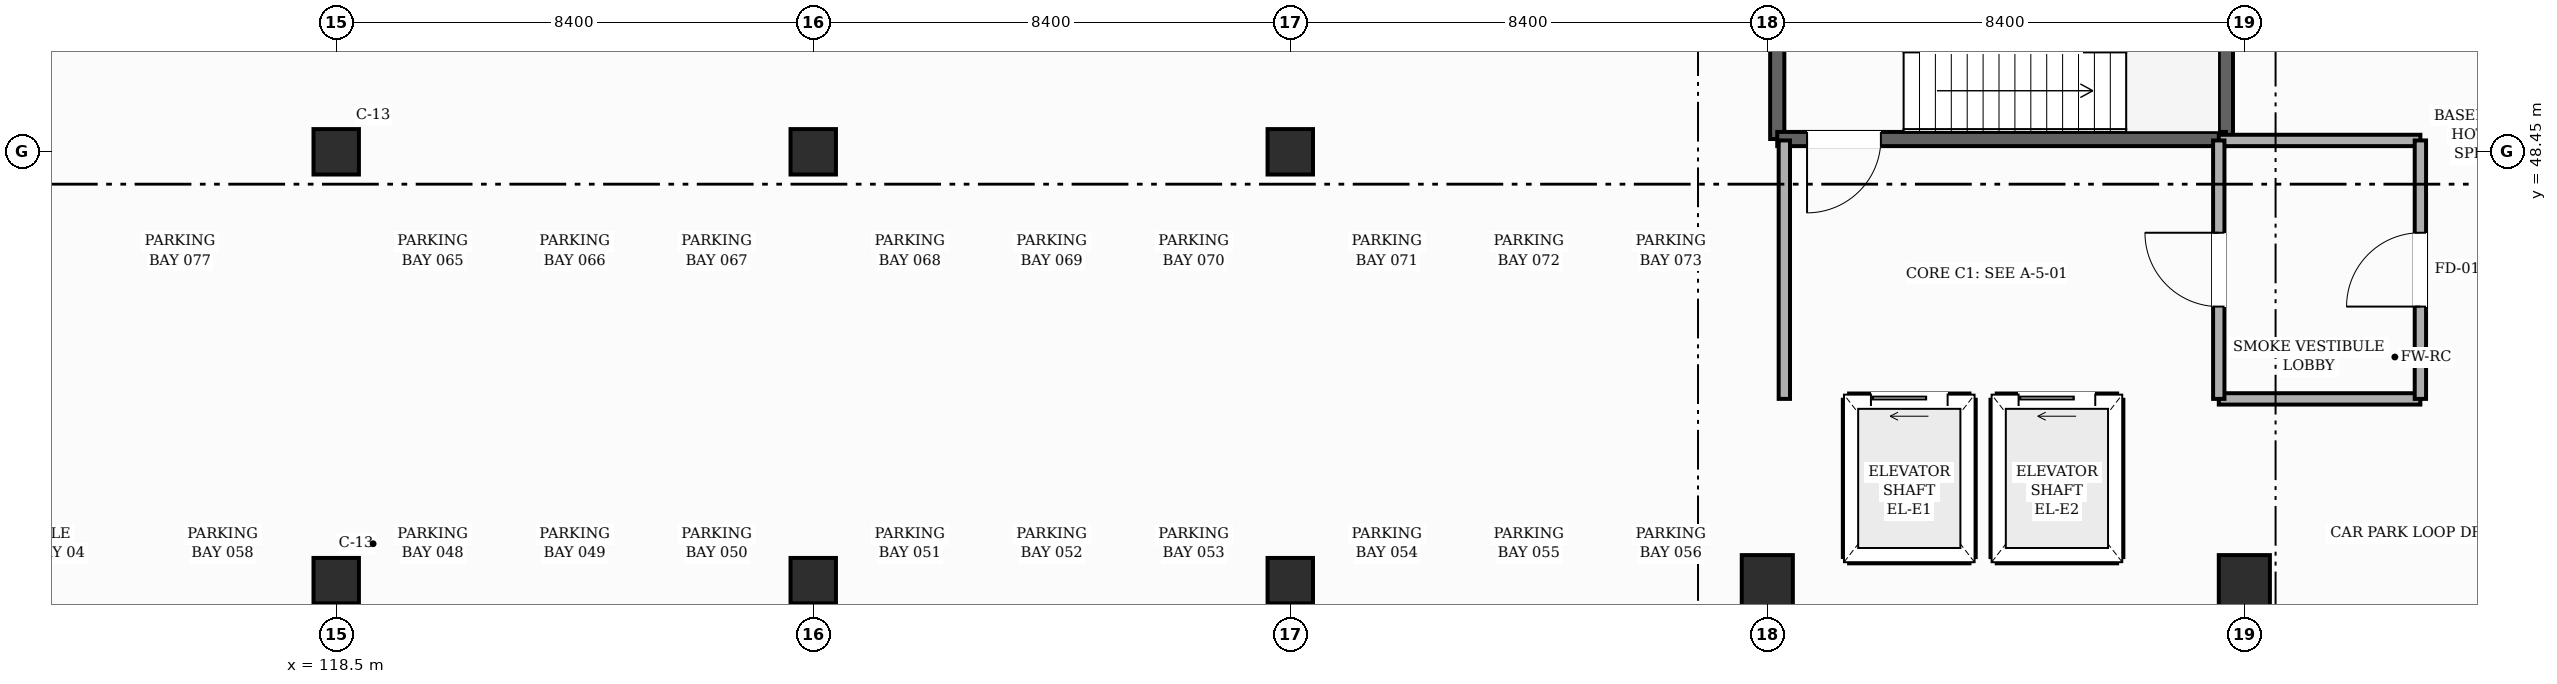
"""IFC4 building model, lengths in metres.
Left out: names, types, materials, properties, quantities, classifications, styles, units other than length and angle.
Written with IfcOpenShell. Run it as: python <this file> out.ifc"""

import sys

from ifc_helpers import new_model, si_unit, direction, frame, frame_2d, origin, origin_2d, place, context, subcontext, project, spatial, rectangle, hollow_rectangle, extrude, element, fill, save


model = new_model("IFC4")
c1 = context("Model", 3, precision=1e-05, world=origin(), true_north=direction((0.0, 1.0)))
c2 = subcontext(c1, "Body", "Model", "MODEL_VIEW")
j1 = project(units=[si_unit("LENGTHUNIT", "METRE"), si_unit("PLANEANGLEUNIT", "RADIAN")], contexts=[c1])
p1 = place(None, origin())
s1 = spatial("IfcSite", under=j1, at=p1, CompositionType="ELEMENT")
p2 = place(p1, origin())
s2 = spatial("IfcBuilding", under=s1, at=p2, CompositionType="ELEMENT")
p3 = place(p2, frame((0.0, 0.0, -5.4)))
s3 = spatial("IfcBuildingStorey", under=s2, at=p3, CompositionType="ELEMENT", Elevation=-5.4)
for number, where, z_axis, x_axis in (
    (1, (118.5, 40.9, 0.0), (0.0, 0.0, 1.0), (1.0, 0.0, 0.0)),
    (2, (118.5, 48.45, 0.0), (0.0, 0.0, 1.0), (1.0, 0.0, 0.0)),
    (3, (126.9, 40.9, 0.0), (0.0, 0.0, 1.0), (1.0, 0.0, 0.0)),
    (4, (126.9, 48.45, 0.0), (0.0, 0.0, 1.0), (1.0, 0.0, 0.0)),
    (5, (135.3, 40.9, 0.0), (0.0, 0.0, 1.0), (1.0, 0.0, 0.0)),
    (6, (135.3, 48.45, 0.0), (0.0, 0.0, 1.0), (1.0, 0.0, 0.0)),
):
    element("IfcColumn", number, at=place(p3, frame(where, z_axis=z_axis, x_axis=x_axis)), inside=s3, PredefinedType="COLUMN", context=c2, shape_type="SweptSolid", body=[
        extrude(rectangle(XDim=0.8, YDim=0.8, at=origin_2d()), origin(), (0.0, 0.0, 1.0), 5.12),
    ])
for number, where, z_axis, x_axis in (
    (7, (143.7, 40.9, 0.0), (0.0, 0.0, 1.0), (1.0, 0.0, 0.0)),
    (8, (152.1, 40.9, 0.0), (0.0, 0.0, 1.0), (1.0, 0.0, 0.0)),
):
    element("IfcColumn", number, at=place(p3, frame(where, z_axis=z_axis, x_axis=x_axis)), inside=s3, PredefinedType="COLUMN", context=c2, shape_type="SweptSolid", body=[
        extrude(hollow_rectangle(XDim=0.9, YDim=0.9, WallThickness=0.032, InnerFilletRadius=0.032, OuterFilletRadius=0.064, at=origin_2d()), origin(), (0.0, 0.0, 1.0), 5.4),
    ])
for number, where, z_axis, x_axis in (
    (9, (143.875, 48.675, 0.0), (0.0, 0.0, 1.0), (0.0, 1.0, 0.0)),
    (10, (151.775, 52.025, 0.0), (0.0, 0.0, 1.0), (0.0, -1.0, 0.0)),
):
    element("IfcWall", number, at=place(p3, frame(where, z_axis=z_axis, x_axis=x_axis)), inside=s3, PredefinedType="SHEAR", context=c2, shape_type="SweptSolid", body=[
        extrude(rectangle(XDim=3.35, YDim=0.25, at=frame_2d((1.675, 0.0))), origin(), (0.0, 0.0, 1.0), 5.12),
    ])
p4 = place(p3, frame((151.775, 48.675, 0.0), z_axis=(0.0, 0.0, 1.0), x_axis=(-1.0, 0.0, 0.0)))
e11 = element("IfcWall", 11, at=p4, inside=s3, PredefinedType="SHEAR", context=c2, shape_type="SweptSolid", body=[
    extrude(rectangle(XDim=7.9, YDim=0.25, at=frame_2d((3.95, 0.0))), origin(), (0.0, 0.0, 1.0), 5.12),
])
p5 = place(p4, frame((6.075, 0.0, 0.0)))
e12 = element("IfcOpeningElement", 12, at=p5, cuts=e11, PredefinedType="OPENING", context=c2, shape_type="SweptSolid", body=[
    extrude(rectangle(XDim=1.3, YDim=2.2, at=frame_2d((0.65, 1.1))), frame((0.0, 0.135, 0.0), z_axis=(0.0, -1.0, 0.0), x_axis=(1.0, 0.0, 0.0)), (0.0, 0.0, 1.0), 0.27),
])
p6 = place(p3, frame((145.14, 44.085, 0.0), z_axis=(0.0, 0.0, 1.0), x_axis=(1.0, 0.0, 0.0)))
e13 = element("IfcWall", 13, at=p6, inside=s3, PredefinedType="SHEAR", context=c2, shape_type="SweptSolid", body=[
    extrude(rectangle(XDim=2.12, YDim=0.22, at=frame_2d((1.06, 0.0))), origin(), (0.0, 0.0, 1.0), 5.12),
])
p7 = place(p6, frame((0.385, 0.0, 0.0)))
e14 = element("IfcOpeningElement", 14, at=p7, cuts=e13, PredefinedType="OPENING", context=c2, shape_type="SweptSolid", body=[
    extrude(rectangle(XDim=1.35, YDim=2.3, at=frame_2d((0.675, 1.15))), frame((0.0, 0.12, 0.0), z_axis=(0.0, -1.0, 0.0), x_axis=(1.0, 0.0, 0.0)), (0.0, 0.0, 1.0), 0.24),
])
p8 = place(p3, frame((145.14, 41.315, 0.0), z_axis=(0.0, 0.0, 1.0), x_axis=(1.0, 0.0, 0.0)))
e15 = element("IfcWall", 15, at=p8, inside=s3, PredefinedType="SHEAR", context=c2, shape_type="SweptSolid", body=[
    extrude(rectangle(XDim=2.12, YDim=0.22, at=frame_2d((1.06, 0.0))), origin(), (0.0, 0.0, 1.0), 5.12),
])
for number, where, z_axis, x_axis in (
    (16, (147.26, 41.315, 0.0), (0.0, 0.0, 1.0), (0.0, 1.0, 0.0)),
    (17, (145.14, 41.315, 0.0), (0.0, 0.0, 1.0), (0.0, 1.0, 0.0)),
):
    element("IfcWall", number, at=place(p3, frame(where, z_axis=z_axis, x_axis=x_axis)), inside=s3, PredefinedType="SHEAR", context=c2, shape_type="SweptSolid", body=[
        extrude(rectangle(XDim=2.77, YDim=0.22, at=frame_2d((1.385, 0.0))), origin(), (0.0, 0.0, 1.0), 5.12),
    ])
p9 = place(p3, frame((147.74, 44.085, 0.0), z_axis=(0.0, 0.0, 1.0), x_axis=(1.0, 0.0, 0.0)))
e18 = element("IfcWall", 18, at=p9, inside=s3, PredefinedType="SHEAR", context=c2, shape_type="SweptSolid", body=[
    extrude(rectangle(XDim=2.12, YDim=0.22, at=frame_2d((1.06, 0.0))), origin(), (0.0, 0.0, 1.0), 5.12),
])
p10 = place(p9, frame((0.385, 0.0, 0.0)))
e19 = element("IfcOpeningElement", 19, at=p10, cuts=e18, PredefinedType="OPENING", context=c2, shape_type="SweptSolid", body=[
    extrude(rectangle(XDim=1.35, YDim=2.3, at=frame_2d((0.675, 1.15))), frame((0.0, 0.12, 0.0), z_axis=(0.0, -1.0, 0.0), x_axis=(1.0, 0.0, 0.0)), (0.0, 0.0, 1.0), 0.24),
])
p11 = place(p3, frame((147.74, 41.315, 0.0), z_axis=(0.0, 0.0, 1.0), x_axis=(1.0, 0.0, 0.0)))
e20 = element("IfcWall", 20, at=p11, inside=s3, PredefinedType="SHEAR", context=c2, shape_type="SweptSolid", body=[
    extrude(rectangle(XDim=2.12, YDim=0.22, at=frame_2d((1.06, 0.0))), origin(), (0.0, 0.0, 1.0), 5.12),
])
for number, where, z_axis, x_axis in (
    (21, (149.86, 41.315, 0.0), (0.0, 0.0, 1.0), (0.0, 1.0, 0.0)),
    (22, (147.74, 41.315, 0.0), (0.0, 0.0, 1.0), (0.0, 1.0, 0.0)),
):
    element("IfcWall", number, at=place(p3, frame(where, z_axis=z_axis, x_axis=x_axis)), inside=s3, PredefinedType="SHEAR", context=c2, shape_type="SweptSolid", body=[
        extrude(rectangle(XDim=2.77, YDim=0.22, at=frame_2d((1.385, 0.0))), origin(), (0.0, 0.0, 1.0), 5.12),
    ])
p12 = place(p3, frame((151.65, 44.1, 0.0), z_axis=(0.0, 0.0, 1.0), x_axis=(1.0, 0.0, 0.0)))
e23 = element("IfcWall", 23, at=p12, inside=s3, PredefinedType="SOLIDWALL", context=c2, shape_type="SweptSolid", body=[
    extrude(rectangle(XDim=3.55, YDim=0.2, at=frame_2d((1.775, 0.0))), origin(), (0.0, 0.0, 1.0), 5.105),
])
p13 = place(p3, frame((151.65, 48.65, 0.0), z_axis=(0.0, 0.0, 1.0), x_axis=(1.0, 0.0, 0.0)))
e24 = element("IfcWall", 24, at=p13, inside=s3, PredefinedType="SOLIDWALL", context=c2, shape_type="SweptSolid", body=[
    extrude(rectangle(XDim=3.55, YDim=0.2, at=frame_2d((1.775, 0.0))), origin(), (0.0, 0.0, 1.0), 3.295),
])
p14 = place(p3, frame((144.0, 44.1, 0.0), z_axis=(0.0, 0.0, 1.0), x_axis=(0.0, 1.0, 0.0)))
e25 = element("IfcWall", 25, at=p14, inside=s3, PredefinedType="SOLIDWALL", context=c2, shape_type="SweptSolid", body=[
    extrude(rectangle(XDim=4.55, YDim=0.2, at=frame_2d((2.275, 0.0))), origin(), (0.0, 0.0, 1.0), 4.195),
])
p15 = place(p3, frame((151.65, 44.1, 0.0), z_axis=(0.0, 0.0, 1.0), x_axis=(0.0, 1.0, 0.0)))
e26 = element("IfcWall", 26, at=p15, inside=s3, PredefinedType="SOLIDWALL", context=c2, shape_type="SweptSolid", body=[
    extrude(rectangle(XDim=4.55, YDim=0.2, at=frame_2d((2.275, 0.0))), origin(), (0.0, 0.0, 1.0), 5.105),
])
p16 = place(p15, frame((1.625, 0.0, 0.0)))
e27 = element("IfcOpeningElement", 27, at=p16, cuts=e26, PredefinedType="OPENING", context=c2, shape_type="SweptSolid", body=[
    extrude(rectangle(XDim=1.3, YDim=2.2, at=frame_2d((0.65, 1.1))), frame((0.0, 0.11, 0.0), z_axis=(0.0, -1.0, 0.0), x_axis=(1.0, 0.0, 0.0)), (0.0, 0.0, 1.0), 0.22),
])
p17 = place(p3, frame((155.2, 44.1, 0.0), z_axis=(0.0, 0.0, 1.0), x_axis=(0.0, 1.0, 0.0)))
e28 = element("IfcWall", 28, at=p17, inside=s3, PredefinedType="SOLIDWALL", context=c2, shape_type="SweptSolid", body=[
    extrude(rectangle(XDim=4.55, YDim=0.2, at=frame_2d((2.275, 0.0))), origin(), (0.0, 0.0, 1.0), 5.105),
])
p18 = place(p17, frame((1.625, 0.0, 0.0)))
e29 = element("IfcOpeningElement", 29, at=p18, cuts=e28, PredefinedType="OPENING", context=c2, shape_type="SweptSolid", body=[
    extrude(rectangle(XDim=1.3, YDim=2.2, at=frame_2d((0.65, 1.1))), frame((0.0, 0.11, 0.0), z_axis=(0.0, -1.0, 0.0), x_axis=(1.0, 0.0, 0.0)), (0.0, 0.0, 1.0), 0.22),
])
p19 = place(p5, origin())
e30 = element("IfcDoor", 30, at=p19, inside=s3, OperationType="SINGLE_SWING_RIGHT", PredefinedType="DOOR", context=c2, shape_type="SweptSolid", body=[
    extrude(rectangle(XDim=1.3, YDim=2.2, at=frame_2d((0.65, 1.1))), frame((0.0, 0.025, 0.0), z_axis=(0.0, -1.0, 0.0), x_axis=(1.0, 0.0, 0.0)), (0.0, 0.0, 1.0), 0.05),
])
fill(e12, e30)
p20 = place(p7, origin())
e31 = element("IfcDoor", 31, at=p20, inside=s3, OperationType="SLIDING_TO_LEFT", PredefinedType="DOOR", context=c2, shape_type="SweptSolid", body=[
    extrude(rectangle(XDim=1.35, YDim=2.3, at=frame_2d((0.675, 1.15))), frame((0.0, 0.025, 0.0), z_axis=(0.0, -1.0, 0.0), x_axis=(1.0, 0.0, 0.0)), (0.0, 0.0, 1.0), 0.05),
])
fill(e14, e31)
p21 = place(p10, origin())
e32 = element("IfcDoor", 32, at=p21, inside=s3, OperationType="SLIDING_TO_LEFT", PredefinedType="DOOR", context=c2, shape_type="SweptSolid", body=[
    extrude(rectangle(XDim=1.35, YDim=2.3, at=frame_2d((0.675, 1.15))), frame((0.0, 0.025, 0.0), z_axis=(0.0, -1.0, 0.0), x_axis=(1.0, 0.0, 0.0)), (0.0, 0.0, 1.0), 0.05),
])
fill(e19, e32)
p22 = place(p16, origin())
e33 = element("IfcDoor", 33, at=p22, inside=s3, OperationType="SINGLE_SWING_RIGHT", PredefinedType="DOOR", context=c2, shape_type="SweptSolid", body=[
    extrude(rectangle(XDim=1.3, YDim=2.2, at=frame_2d((0.65, 1.1))), frame((0.0, 0.025, 0.0), z_axis=(0.0, -1.0, 0.0), x_axis=(1.0, 0.0, 0.0)), (0.0, 0.0, 1.0), 0.05),
])
fill(e27, e33)
p23 = place(p18, origin())
e34 = element("IfcDoor", 34, at=p23, inside=s3, OperationType="SINGLE_SWING_LEFT", PredefinedType="DOOR", context=c2, shape_type="SweptSolid", body=[
    extrude(rectangle(XDim=1.3, YDim=2.2, at=frame_2d((0.65, 1.1))), frame((0.0, 0.025, 0.0), z_axis=(0.0, -1.0, 0.0), x_axis=(1.0, 0.0, 0.0)), (0.0, 0.0, 1.0), 0.05),
])
fill(e29, e34)
save(model, sys.argv[1])
